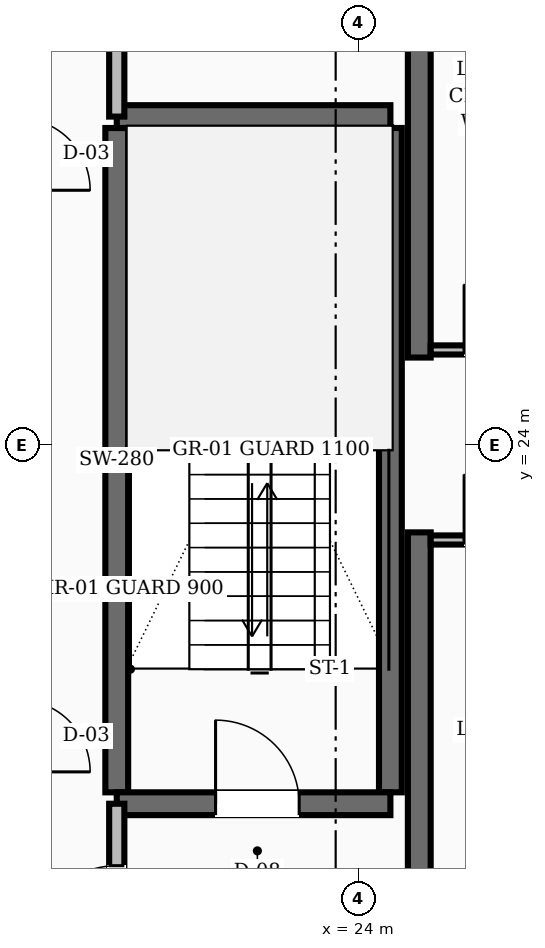
"""IFC4 building model, lengths in metres.
Left out: names, types, materials, properties, quantities, classifications, styles, units other than length and angle.
Written with IfcOpenShell. Run it as: python <this file> out.ifc"""

import sys

from ifc_helpers import new_model, si_unit, direction, frame, frame_2d, origin, place, context, subcontext, project, spatial, rectangle, extrude, element, fill, save


model = new_model("IFC4")
c1 = context("Model", 3, precision=1e-05, world=origin(), true_north=direction((0.0, 1.0)))
c2 = subcontext(c1, "Body", "Model", "MODEL_VIEW")
j1 = project(units=[si_unit("LENGTHUNIT", "METRE"), si_unit("PLANEANGLEUNIT", "RADIAN")], contexts=[c1])
p1 = place(None, origin())
s1 = spatial("IfcSite", under=j1, at=p1, CompositionType="ELEMENT")
p2 = place(p1, origin())
s2 = spatial("IfcBuilding", under=s1, at=p2, CompositionType="ELEMENT")
p3 = place(p2, frame((0.0, 0.0, 265.2)))
s3 = spatial("IfcBuildingStorey", under=s2, at=p3, CompositionType="ELEMENT", Elevation=265.2)
for number, where, z_axis, x_axis in (
    (1, (24.8, 16.55, 0.0), (0.0, 0.0, 1.0), (0.0, 1.0, 0.0)),
    (2, (24.8, 25.15, 0.0), (0.0, 0.0, 1.0), (0.0, 1.0, 0.0)),
):
    element("IfcWall", number, at=place(p3, frame(where, z_axis=z_axis, x_axis=x_axis)), inside=s3, PredefinedType="SHEAR", context=c2, shape_type="SweptSolid", body=[
        extrude(rectangle(XDim=6.3, YDim=0.3, at=frame_2d((3.15, 0.0))), origin(), (0.0, 0.0, 1.0), 3.6),
    ])
for number, where, z_axis, x_axis in (
    (3, (20.82, 19.43, 0.0), (0.0, 0.0, 1.0), (0.0, 1.0, 0.0)),
    (4, (24.42, 19.43, 0.0), (0.0, 0.0, 1.0), (0.0, 1.0, 0.0)),
):
    element("IfcWall", number, at=place(p3, frame(where, z_axis=z_axis, x_axis=x_axis)), inside=s3, PredefinedType="SHEAR", context=c2, shape_type="SweptSolid", body=[
        extrude(rectangle(XDim=8.74, YDim=0.3, at=frame_2d((4.37, 0.0))), origin(), (0.0, 0.0, 1.0), 3.6),
    ])
p4 = place(p3, frame((20.82, 19.28, 0.0), z_axis=(0.0, 0.0, 1.0), x_axis=(1.0, 0.0, 0.0)))
e5 = element("IfcWall", 5, at=p4, inside=s3, PredefinedType="SHEAR", context=c2, shape_type="SweptSolid", body=[
    extrude(rectangle(XDim=3.6, YDim=0.3, at=frame_2d((1.8, 0.0))), origin(), (0.0, 0.0, 1.0), 3.6),
])
p5 = place(p4, frame((1.3, 0.0, 0.0)))
e6 = element("IfcOpeningElement", 6, at=p5, cuts=e5, PredefinedType="OPENING", context=c2, shape_type="SweptSolid", body=[
    extrude(rectangle(XDim=1.1, YDim=2.1, at=frame_2d((0.55, 1.05))), frame((0.0, 0.16, 0.0), z_axis=(0.0, -1.0, 0.0), x_axis=(1.0, 0.0, 0.0)), (0.0, 0.0, 1.0), 0.32),
])
p6 = place(p3, frame((20.82, 28.32, 0.0), z_axis=(0.0, 0.0, 1.0), x_axis=(1.0, 0.0, 0.0)))
e7 = element("IfcWall", 7, at=p6, inside=s3, PredefinedType="SHEAR", context=c2, shape_type="SweptSolid", body=[
    extrude(rectangle(XDim=3.6, YDim=0.3, at=frame_2d((1.8, 0.0))), origin(), (0.0, 0.0, 1.0), 3.6),
])
p7 = place(p3, frame((20.82, 16.55, 0.0), z_axis=(0.0, 0.0, 1.0), x_axis=(0.0, 1.0, 0.0)))
e8 = element("IfcWall", 8, at=p7, inside=s3, PredefinedType="SOLIDWALL", context=c2, shape_type="SweptSolid", body=[
    extrude(rectangle(XDim=2.73, YDim=0.2, at=frame_2d((1.365, 0.0))), origin(), (0.0, 0.0, 1.0), 2.87),
])
p8 = place(p7, frame((0.815, 0.0, 0.0)))
e9 = element("IfcOpeningElement", 9, at=p8, cuts=e8, PredefinedType="OPENING", context=c2, shape_type="SweptSolid", body=[
    extrude(rectangle(XDim=1.1, YDim=2.1, at=frame_2d((0.55, 1.05))), frame((0.0, 0.11, 0.0), z_axis=(0.0, -1.0, 0.0), x_axis=(1.0, 0.0, 0.0)), (0.0, 0.0, 1.0), 0.22),
])
p9 = place(p3, frame((20.82, 28.32, 0.0), z_axis=(0.0, 0.0, 1.0), x_axis=(0.0, 1.0, 0.0)))
e10 = element("IfcWall", 10, at=p9, inside=s3, PredefinedType="SOLIDWALL", context=c2, shape_type="SweptSolid", body=[
    extrude(rectangle(XDim=3.13, YDim=0.2, at=frame_2d((1.565, 0.0))), origin(), (0.0, 0.0, 1.0), 2.87),
])
p10 = place(p9, frame((1.09, 0.0, 0.0)))
e11 = element("IfcOpeningElement", 11, at=p10, cuts=e10, PredefinedType="OPENING", context=c2, shape_type="SweptSolid", body=[
    extrude(rectangle(XDim=0.95, YDim=2.1, at=frame_2d((0.475, 1.05))), frame((0.0, 0.11, 0.0), z_axis=(0.0, -1.0, 0.0), x_axis=(1.0, 0.0, 0.0)), (0.0, 0.0, 1.0), 0.22),
])
p11 = place(p3, frame((24.95, 25.25, 0.0), z_axis=(0.0, 0.0, 1.0), x_axis=(1.0, 0.0, 0.0)))
e12 = element("IfcWall", 12, at=p11, inside=s3, PredefinedType="PARTITIONING", context=c2, shape_type="SweptSolid", body=[
    extrude(rectangle(XDim=3.2, YDim=0.12, at=frame_2d((1.6, 0.0))), origin(), (0.0, 0.0, 1.0), 2.87),
])
p12 = place(p11, frame((0.44, 0.0, 0.0)))
e13 = element("IfcOpeningElement", 13, at=p12, cuts=e12, PredefinedType="OPENING", context=c2, shape_type="SweptSolid", body=[
    extrude(rectangle(XDim=0.86, YDim=2.1, at=frame_2d((0.43, 1.05))), frame((0.0, 0.07, 0.0), z_axis=(0.0, -1.0, 0.0), x_axis=(1.0, 0.0, 0.0)), (0.0, 0.0, 1.0), 0.14),
])
p13 = place(p11, frame((1.9, 0.0, 0.0)))
e14 = element("IfcOpeningElement", 14, at=p13, cuts=e12, PredefinedType="OPENING", context=c2, shape_type="SweptSolid", body=[
    extrude(rectangle(XDim=0.86, YDim=2.1, at=frame_2d((0.43, 1.05))), frame((0.0, 0.07, 0.0), z_axis=(0.0, -1.0, 0.0), x_axis=(1.0, 0.0, 0.0)), (0.0, 0.0, 1.0), 0.14),
])
p14 = place(p3, frame((24.95, 22.75, 0.0), z_axis=(0.0, 0.0, 1.0), x_axis=(1.0, 0.0, 0.0)))
e15 = element("IfcWall", 15, at=p14, inside=s3, PredefinedType="PARTITIONING", context=c2, shape_type="SweptSolid", body=[
    extrude(rectangle(XDim=3.2, YDim=0.12, at=frame_2d((1.6, 0.0))), origin(), (0.0, 0.0, 1.0), 2.87),
])
p15 = place(p14, frame((0.44, 0.0, 0.0)))
e16 = element("IfcOpeningElement", 16, at=p15, cuts=e15, PredefinedType="OPENING", context=c2, shape_type="SweptSolid", body=[
    extrude(rectangle(XDim=0.86, YDim=2.1, at=frame_2d((0.43, 1.05))), frame((0.0, 0.07, 0.0), z_axis=(0.0, -1.0, 0.0), x_axis=(1.0, 0.0, 0.0)), (0.0, 0.0, 1.0), 0.14),
])
p16 = place(p14, frame((1.9, 0.0, 0.0)))
e17 = element("IfcOpeningElement", 17, at=p16, cuts=e15, PredefinedType="OPENING", context=c2, shape_type="SweptSolid", body=[
    extrude(rectangle(XDim=0.86, YDim=2.1, at=frame_2d((0.43, 1.05))), frame((0.0, 0.07, 0.0), z_axis=(0.0, -1.0, 0.0), x_axis=(1.0, 0.0, 0.0)), (0.0, 0.0, 1.0), 0.14),
])
p17 = place(p5, origin())
e18 = element("IfcDoor", 18, at=p17, inside=s3, OperationType="SINGLE_SWING_LEFT", PredefinedType="DOOR", context=c2, shape_type="SweptSolid", body=[
    extrude(rectangle(XDim=1.1, YDim=2.1, at=frame_2d((0.55, 1.05))), frame((0.0, 0.025, 0.0), z_axis=(0.0, -1.0, 0.0), x_axis=(1.0, 0.0, 0.0)), (0.0, 0.0, 1.0), 0.05),
])
fill(e6, e18)
p18 = place(p8, origin())
e19 = element("IfcDoor", 19, at=p18, inside=s3, OperationType="SINGLE_SWING_LEFT", PredefinedType="DOOR", context=c2, shape_type="SweptSolid", body=[
    extrude(rectangle(XDim=1.1, YDim=2.1, at=frame_2d((0.55, 1.05))), frame((0.0, 0.025, 0.0), z_axis=(0.0, -1.0, 0.0), x_axis=(1.0, 0.0, 0.0)), (0.0, 0.0, 1.0), 0.05),
])
fill(e9, e19)
p19 = place(p12, origin())
e20 = element("IfcDoor", 20, at=p19, inside=s3, OperationType="SINGLE_SWING_LEFT", PredefinedType="DOOR", context=c2, shape_type="SweptSolid", body=[
    extrude(rectangle(XDim=0.86, YDim=2.1, at=frame_2d((0.43, 1.05))), frame((0.0, 0.025, 0.0), z_axis=(0.0, -1.0, 0.0), x_axis=(1.0, 0.0, 0.0)), (0.0, 0.0, 1.0), 0.05),
])
fill(e13, e20)
p20 = place(p15, origin())
e21 = element("IfcDoor", 21, at=p20, inside=s3, OperationType="SINGLE_SWING_LEFT", PredefinedType="DOOR", context=c2, shape_type="SweptSolid", body=[
    extrude(rectangle(XDim=0.86, YDim=2.1, at=frame_2d((0.43, 1.05))), frame((0.0, 0.025, 0.0), z_axis=(0.0, -1.0, 0.0), x_axis=(1.0, 0.0, 0.0)), (0.0, 0.0, 1.0), 0.05),
])
fill(e16, e21)
save(model, sys.argv[1])
